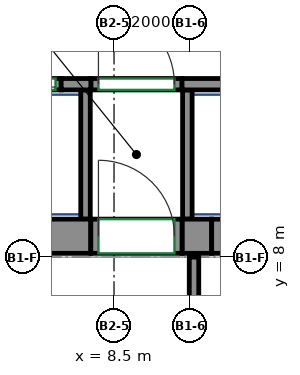
"""IFC4 building model, lengths in metres.
Left out: names, types, materials, properties, quantities, classifications, styles, units other than length and angle.
Written with IfcOpenShell. Run it as: python <this file> out.ifc"""

import sys

from ifc_helpers import new_model, si_unit, direction, frame, frame_2d, origin, place, context, subcontext, project, spatial, rectangle, extrude, source, transform, mapped, element, fill, save


model = new_model("IFC4")
c1 = context("Model", 3, precision=1e-05, world=origin(), true_north=direction((0.0, 1.0)))
c2 = subcontext(c1, "Body", "Model", "MODEL_VIEW")
j1 = project(units=[si_unit("LENGTHUNIT", "METRE"), si_unit("PLANEANGLEUNIT", "RADIAN")], contexts=[c1])
p1 = place(None, origin())
s1 = spatial("IfcSite", under=j1, at=p1, CompositionType="ELEMENT")
p2 = place(p1, origin())
s2 = spatial("IfcBuilding", under=s1, at=p2, CompositionType="ELEMENT")
p3 = place(p2, frame((0.0, 0.0, 108.6)))
s3 = spatial("IfcBuildingStorey", under=s2, at=p3, CompositionType="ELEMENT", Elevation=108.6)
m1 = source(origin(), c2, "Body", "SweptSolid", [
    extrude(rectangle(XDim=14.18, YDim=0.9, at=frame_2d((7.09, 0.0))), origin(), (0.0, 0.0, 1.0), 3.72),
])
p4 = place(p3, frame((-6.29, 8.55, 0.0), z_axis=(0.0, 0.0, 1.0), x_axis=(1.0, 0.0, 0.0)))
e1 = element("IfcWall", 1, at=p4, inside=s3, PredefinedType="SHEAR", context=c2, shape_type="MappedRepresentation", body=[
    mapped(m1, transform((0.0, 0.0, 0.0))),
])
m2 = source(origin(), c2, "Body", "SweptSolid", [
    extrude(rectangle(XDim=0.78, YDim=0.9, at=frame_2d((0.39, 0.0))), origin(), (0.0, 0.0, 1.0), 3.72),
])
p5 = place(p3, frame((10.29, 8.55, 0.0), z_axis=(0.0, 0.0, 1.0), x_axis=(1.0, 0.0, 0.0)))
e2 = element("IfcWall", 2, at=p5, inside=s3, PredefinedType="SHEAR", context=c2, shape_type="MappedRepresentation", body=[
    mapped(m2, transform((0.0, 0.0, 0.0))),
])
m3 = source(origin(), c2, "Body", "SweptSolid", [
    extrude(rectangle(XDim=0.78, YDim=0.3, at=frame_2d((0.39, 0.0))), origin(), (0.0, 0.0, 1.0), 3.72),
])
p6 = place(p3, frame((7.11, 12.55, 0.0), z_axis=(0.0, 0.0, 1.0), x_axis=(1.0, 0.0, 0.0)))
e3 = element("IfcWall", 3, at=p6, inside=s3, PredefinedType="SHEAR", context=c2, shape_type="MappedRepresentation", body=[
    mapped(m3, transform((0.0, 0.0, 0.0))),
])
m4 = source(origin(), c2, "Body", "SweptSolid", [
    extrude(rectangle(XDim=2.82, YDim=0.3, at=frame_2d((1.41, 0.0))), origin(), (0.0, 0.0, 1.0), 3.72),
])
p7 = place(p3, frame((10.29, 12.55, 0.0), z_axis=(0.0, 0.0, 1.0), x_axis=(1.0, 0.0, 0.0)))
e4 = element("IfcWall", 4, at=p7, inside=s3, PredefinedType="SHEAR", context=c2, shape_type="MappedRepresentation", body=[
    mapped(m4, transform((0.0, 0.0, 0.0))),
])
m5 = source(origin(), c2, "Body", "SweptSolid", [
    extrude(rectangle(XDim=1.4, YDim=0.3, at=frame_2d((0.7, 0.0))), origin(), (0.0, 0.0, 1.0), 3.72),
])
p8 = place(p3, frame((5.71, 12.55, 0.0), z_axis=(0.0, 0.0, 1.0), x_axis=(1.0, 0.0, 0.0)))
e5 = element("IfcWall", 5, at=p8, inside=s3, PredefinedType="PARTITIONING", context=c2, shape_type="MappedRepresentation", body=[
    mapped(m5, transform((0.0, 0.0, 0.0))),
])
p9 = place(p8, frame((0.15, 0.0, 0.0)))
e6 = element("IfcOpeningElement", 6, at=p9, cuts=e5, PredefinedType="OPENING", context=c2, shape_type="SweptSolid", body=[
    extrude(rectangle(XDim=1.1, YDim=2.1, at=frame_2d((0.55, 1.05))), frame((0.0, 0.16, 0.0), z_axis=(0.0, -1.0, 0.0), x_axis=(1.0, 0.0, 0.0)), (0.0, 0.0, 1.0), 0.32),
])
m6 = source(origin(), c2, "Body", "SweptSolid", [
    extrude(rectangle(XDim=2.4, YDim=0.3, at=frame_2d((1.2, 0.0))), origin(), (0.0, 0.0, 1.0), 3.72),
])
p10 = place(p3, frame((7.89, 12.55, 0.0), z_axis=(0.0, 0.0, 1.0), x_axis=(1.0, 0.0, 0.0)))
e7 = element("IfcWall", 7, at=p10, inside=s3, PredefinedType="PARTITIONING", context=c2, shape_type="MappedRepresentation", body=[
    mapped(m6, transform((0.0, 0.0, 0.0))),
])
p11 = place(p10, frame((0.2, 0.0, 0.0)))
e8 = element("IfcOpeningElement", 8, at=p11, cuts=e7, PredefinedType="OPENING", context=c2, shape_type="SweptSolid", body=[
    extrude(rectangle(XDim=2.0, YDim=2.1, at=frame_2d((1.0, 1.05))), frame((0.0, 0.16, 0.0), z_axis=(0.0, -1.0, 0.0), x_axis=(1.0, 0.0, 0.0)), (0.0, 0.0, 1.0), 0.32),
])
m7 = source(origin(), c2, "Body", "SweptSolid", [
    extrude(rectangle(XDim=2.65, YDim=0.25, at=frame_2d((1.325, 0.0))), origin(), (0.0, 0.0, 1.0), 3.72),
])
p12 = place(p3, frame((10.605, 5.35, 0.0), z_axis=(0.0, 0.0, 1.0), x_axis=(0.0, 1.0, 0.0)))
e9 = element("IfcWall", 9, at=p12, inside=s3, PredefinedType="PARTITIONING", context=c2, shape_type="MappedRepresentation", body=[
    mapped(m7, transform((0.0, 0.0, 0.0))),
])
m8 = source(origin(), c2, "Body", "SweptSolid", [
    extrude(rectangle(XDim=3.4, YDim=0.25, at=frame_2d((1.7, 0.0))), origin(), (0.0, 0.0, 1.0), 3.72),
])
for number, where, z_axis, x_axis in (
    (10, (10.43, 9.0, 0.0), (0.0, 0.0, 1.0), (0.0, 1.0, 0.0)),
    (11, (7.75, 9.0, 0.0), (0.0, 0.0, 1.0), (0.0, 1.0, 0.0)),
):
    element("IfcWall", number, at=place(p3, frame(where, z_axis=z_axis, x_axis=x_axis)), inside=s3, PredefinedType="PARTITIONING", context=c2, shape_type="MappedRepresentation", body=[
        mapped(m8, transform((0.0, 0.0, 0.0))),
    ])
m9 = source(origin(), c2, "Body", "SweptSolid", [
    extrude(rectangle(XDim=2.4, YDim=0.9, at=frame_2d((1.2, 0.0))), origin(), (0.0, 0.0, 1.0), 2.7),
])
p13 = place(p3, frame((7.89, 8.55, 0.0), z_axis=(0.0, 0.0, 1.0), x_axis=(1.0, 0.0, 0.0)))
e12 = element("IfcWall", 12, at=p13, inside=s3, PredefinedType="PARTITIONING", context=c2, shape_type="MappedRepresentation", body=[
    mapped(m9, transform((0.0, 0.0, 0.0))),
])
p14 = place(p13, frame((0.2, 0.0, 0.0)))
e13 = element("IfcOpeningElement", 13, at=p14, cuts=e12, PredefinedType="OPENING", context=c2, shape_type="SweptSolid", body=[
    extrude(rectangle(XDim=2.0, YDim=2.1, at=frame_2d((1.0, 1.05))), frame((0.0, 0.46, 0.0), z_axis=(0.0, -1.0, 0.0), x_axis=(1.0, 0.0, 0.0)), (0.0, 0.0, 1.0), 0.92),
])
m10 = source(origin(), c2, "Body", "SweptSolid", [
    extrude(rectangle(XDim=1.4, YDim=0.9, at=frame_2d((0.7, 0.0))), origin(), (0.0, 0.0, 1.0), 2.7),
])
p15 = place(p3, frame((11.07, 8.55, 0.0), z_axis=(0.0, 0.0, 1.0), x_axis=(1.0, 0.0, 0.0)))
e14 = element("IfcWall", 14, at=p15, inside=s3, PredefinedType="PARTITIONING", context=c2, shape_type="MappedRepresentation", body=[
    mapped(m10, transform((0.0, 0.0, 0.0))),
])
p16 = place(p15, frame((0.25, 0.0, 0.0)))
e15 = element("IfcOpeningElement", 15, at=p16, cuts=e14, PredefinedType="OPENING", context=c2, shape_type="SweptSolid", body=[
    extrude(rectangle(XDim=0.9, YDim=2.1, at=frame_2d((0.45, 1.05))), frame((0.0, 0.46, 0.0), z_axis=(0.0, -1.0, 0.0), x_axis=(1.0, 0.0, 0.0)), (0.0, 0.0, 1.0), 0.92),
])
p17 = place(p11, origin())
e16 = element("IfcDoor", 16, at=p17, inside=s3, OperationType="DOUBLE_DOOR_SINGLE_SWING", PredefinedType="DOOR", context=c2, shape_type="SweptSolid", body=[
    extrude(rectangle(XDim=2.0, YDim=2.1, at=frame_2d((1.0, 1.05))), frame((0.0, 0.025, 0.0), z_axis=(0.0, -1.0, 0.0), x_axis=(1.0, 0.0, 0.0)), (0.0, 0.0, 1.0), 0.05),
])
fill(e8, e16)
p18 = place(p14, origin())
e17 = element("IfcDoor", 17, at=p18, inside=s3, OperationType="DOUBLE_DOOR_SINGLE_SWING", PredefinedType="DOOR", context=c2, shape_type="SweptSolid", body=[
    extrude(rectangle(XDim=2.0, YDim=2.1, at=frame_2d((1.0, 1.05))), frame((0.0, 0.355, 0.0), z_axis=(0.0, -1.0, 0.0), x_axis=(1.0, 0.0, 0.0)), (0.0, 0.0, 1.0), 0.05),
])
fill(e13, e17)
p19 = place(p9, origin())
e18 = element("IfcDoor", 18, at=p19, inside=s3, OperationType="DOUBLE_DOOR_SLIDING", PredefinedType="DOOR", context=c2, shape_type="SweptSolid", body=[
    extrude(rectangle(XDim=1.1, YDim=2.1, at=frame_2d((0.55, 1.05))), frame((0.0, 0.025, 0.0), z_axis=(0.0, -1.0, 0.0), x_axis=(1.0, 0.0, 0.0)), (0.0, 0.0, 1.0), 0.05),
])
fill(e6, e18)
save(model, sys.argv[1])
